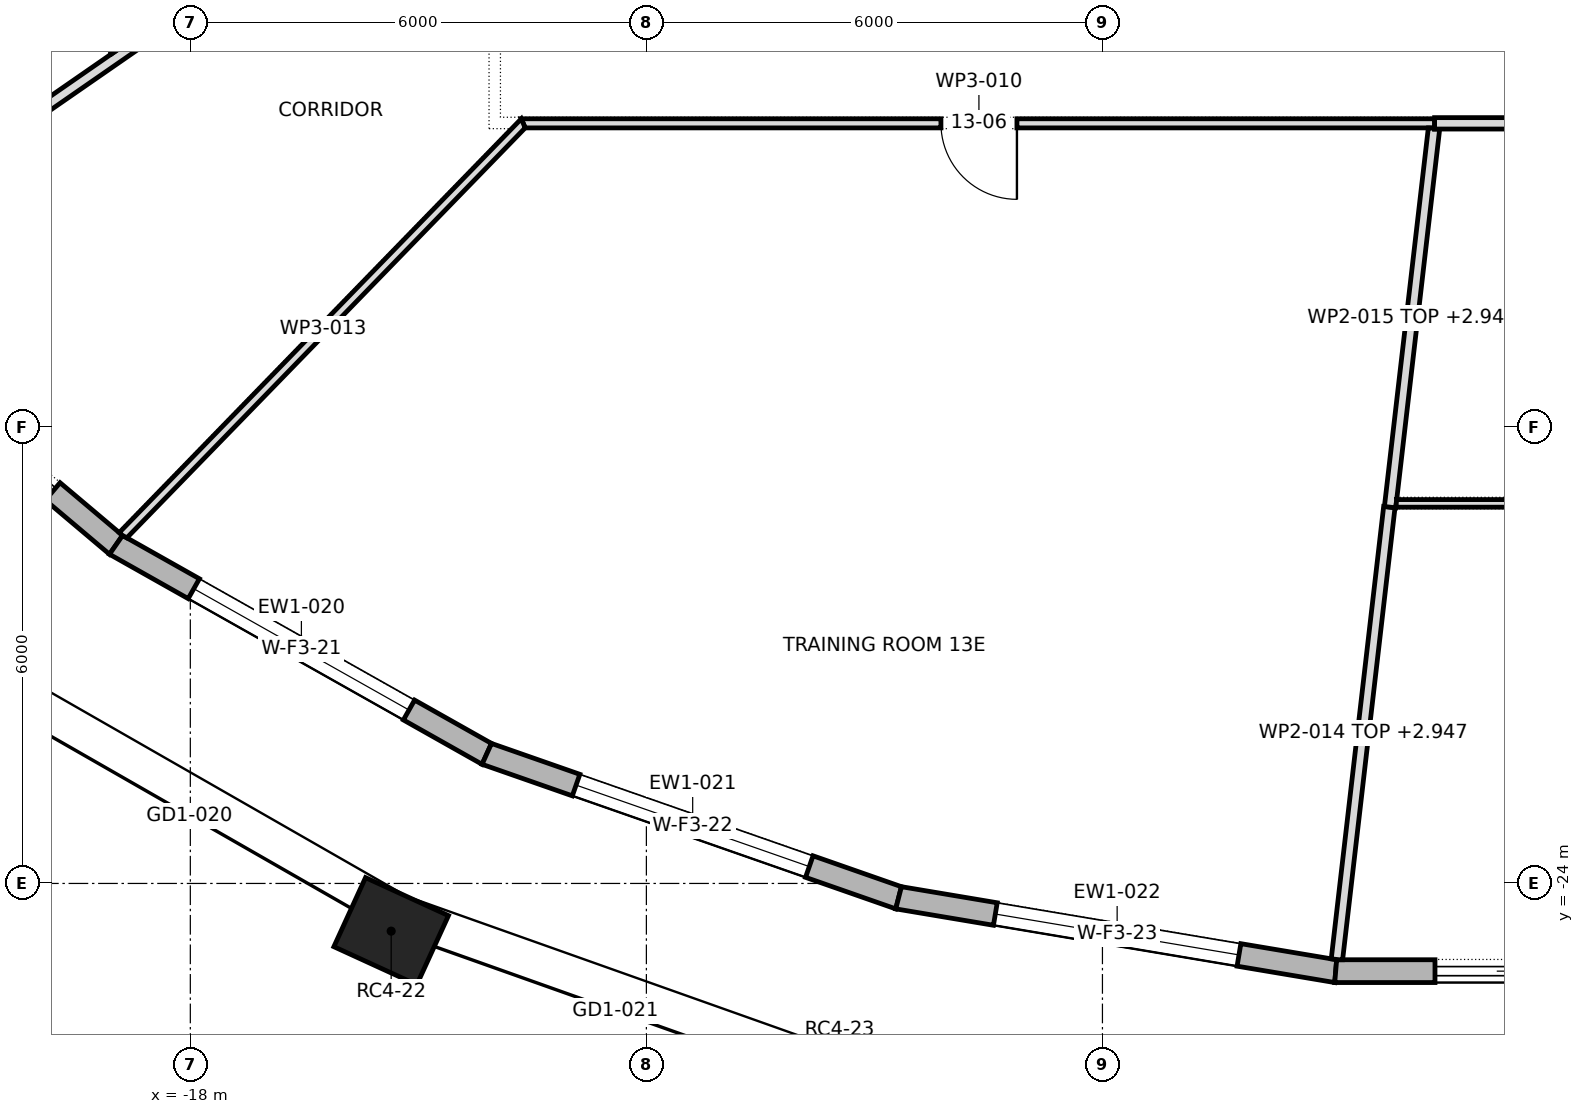
"""IFC4 building model, lengths in metres.
Left out: names, types, materials, properties, quantities, classifications, styles, units other than length and angle.
Written with IfcOpenShell. Run it as: python <this file> out.ifc"""

import sys

from ifc_helpers import new_model, si_unit, direction, frame, frame_2d, origin, origin_2d, place, context, subcontext, project, spatial, polyline, rectangle, outline, extrude, element, fill, save


model = new_model("IFC4")
c1 = context("Model", 3, precision=1e-05, world=origin(), true_north=direction((0.0, 1.0)))
c2 = subcontext(c1, "Body", "Model", "MODEL_VIEW")
j1 = project(units=[si_unit("LENGTHUNIT", "METRE"), si_unit("PLANEANGLEUNIT", "RADIAN")], contexts=[c1])
p1 = place(None, origin())
s1 = spatial("IfcSite", under=j1, at=p1, CompositionType="ELEMENT")
p2 = place(p1, origin())
s2 = spatial("IfcBuilding", under=s1, at=p2, CompositionType="ELEMENT")
p3 = place(p2, frame((0.0, 0.0, 190.9)))
s3 = spatial("IfcBuildingStorey", under=s2, at=p3, CompositionType="ELEMENT", Elevation=190.9)
p4 = place(p3, frame((-15.358, -24.627, 0.0), z_axis=(0.0, 0.0, 1.0), x_axis=(0.909125641902, -0.416521988898, 0.0)))
e1 = element("IfcColumn", 1, at=p4, inside=s3, PredefinedType="COLUMN", context=c2, shape_type="SweptSolid", body=[
    extrude(rectangle(XDim=1.2, YDim=1.0, at=origin_2d()), origin(), (0.0, 0.0, 1.0), 4.0),
])
p5 = place(p3, frame((-23.128, -16.044, 0.0), z_axis=(0.0, 0.0, 1.0), x_axis=(0.764330261608, -0.644824977176, 0.0)))
e2 = element("IfcWall", 2, at=p5, inside=s3, PredefinedType="STANDARD", context=c2, shape_type="SweptSolid", body=[
    extrude(outline(polyline([(-0.015, -0.15), (5.444, -0.15), (5.416, 0.15), (0.015, 0.15), (-0.015, -0.15)])), origin(), (0.0, 0.0, 1.0), 3.7),
])
p6 = place(p5, frame((1.09, 0.0, 0.0)))
e3 = element("IfcOpeningElement", 3, at=p6, cuts=e2, PredefinedType="OPENING", context=c2, shape_type="SweptSolid", body=[
    extrude(rectangle(XDim=3.25, YDim=3.25, at=frame_2d((1.625, 1.625))), frame((0.0, 0.162, 0.0), z_axis=(0.0, -1.0, 0.0), x_axis=(1.0, 0.0, 0.0)), (0.0, 0.0, 1.0), 0.324),
])
p7 = place(p3, frame((-18.977, -19.545, 0.0), z_axis=(0.0, 0.0, 1.0), x_axis=(0.871083701819, -0.491134588912, 0.0)))
e4 = element("IfcWall", 4, at=p7, inside=s3, PredefinedType="STANDARD", context=c2, shape_type="SweptSolid", body=[
    extrude(outline(polyline([(-0.014, -0.15), (5.613, -0.15), (5.586, 0.15), (0.014, 0.15), (-0.014, -0.15)])), origin(), (0.0, 0.0, 1.0), 3.7),
])
p8 = place(p7, frame((1.175, 0.0, 0.6)))
e5 = element("IfcOpeningElement", 5, at=p8, cuts=e4, PredefinedType="OPENING", context=c2, shape_type="SweptSolid", body=[
    extrude(rectangle(XDim=3.25, YDim=2.65, at=frame_2d((1.625, 1.325))), frame((0.0, 0.162, 0.0), z_axis=(0.0, -1.0, 0.0), x_axis=(1.0, 0.0, 0.0)), (0.0, 0.0, 1.0), 0.324),
])
p9 = place(p3, frame((-14.1, -22.295, 0.0), z_axis=(0.0, 0.0, 1.0), x_axis=(0.944020060936, -0.329888048511, 0.0)))
e6 = element("IfcWall", 6, at=p9, inside=s3, PredefinedType="STANDARD", context=c2, shape_type="SweptSolid", body=[
    extrude(outline(polyline([(-0.013, -0.15), (5.752, -0.15), (5.727, 0.15), (0.013, 0.15), (-0.013, -0.15)])), origin(), (0.0, 0.0, 1.0), 3.7),
])
p10 = place(p9, frame((1.245, 0.0, 0.6)))
e7 = element("IfcOpeningElement", 7, at=p10, cuts=e6, PredefinedType="OPENING", context=c2, shape_type="SweptSolid", body=[
    extrude(rectangle(XDim=3.25, YDim=2.65, at=frame_2d((1.625, 1.325))), frame((0.0, 0.162, 0.0), z_axis=(0.0, -1.0, 0.0), x_axis=(1.0, 0.0, 0.0)), (0.0, 0.0, 1.0), 0.324),
])
p11 = place(p3, frame((-8.682, -24.189, 0.0), z_axis=(0.0, 0.0, 1.0), x_axis=(0.986207709048, -0.165512400181, 0.0)))
e8 = element("IfcWall", 8, at=p11, inside=s3, PredefinedType="STANDARD", context=c2, shape_type="SweptSolid", body=[
    extrude(outline(polyline([(-0.013, -0.15), (5.843, -0.15), (5.818, 0.15), (0.013, 0.15), (-0.013, -0.15)])), origin(), (0.0, 0.0, 1.0), 3.7),
])
p12 = place(p11, frame((1.291, 0.0, 0.6)))
e9 = element("IfcOpeningElement", 9, at=p12, cuts=e8, PredefinedType="OPENING", context=c2, shape_type="SweptSolid", body=[
    extrude(rectangle(XDim=3.25, YDim=2.65, at=frame_2d((1.625, 1.325))), frame((0.0, 0.162, 0.0), z_axis=(0.0, -1.0, 0.0), x_axis=(1.0, 0.0, 0.0)), (0.0, 0.0, 1.0), 0.324),
])
p13 = place(p3, frame((-2.931, -25.154, 0.0), z_axis=(0.0, 0.0, 1.0), x_axis=(1.0, 0.0, 0.0)))
e10 = element("IfcWall", 10, at=p13, inside=s3, PredefinedType="STANDARD", context=c2, shape_type="SweptSolid", body=[
    extrude(outline(polyline([(-0.012, -0.15), (5.875, -0.15), (5.85, 0.15), (0.012, 0.15), (-0.012, -0.15)])), origin(), (0.0, 0.0, 1.0), 3.7),
])
p14 = place(p13, frame((1.306, 0.0, 0.0)))
e11 = element("IfcOpeningElement", 11, at=p14, cuts=e10, PredefinedType="OPENING", context=c2, shape_type="SweptSolid", body=[
    extrude(rectangle(XDim=3.25, YDim=3.25, at=frame_2d((1.625, 1.625))), frame((0.0, 0.162, 0.0), z_axis=(0.0, -1.0, 0.0), x_axis=(1.0, 0.0, 0.0)), (0.0, 0.0, 1.0), 0.324),
])
p15 = place(p3, frame((-23.024, -15.94, 0.0), z_axis=(0.0, 0.0, 1.0), x_axis=(0.822097241007, 0.569347105313, 0.0)))
e12 = element("IfcWall", 12, at=p15, inside=s3, PredefinedType="PARTITIONING", context=c2, shape_type="SweptSolid", body=[
    extrude(outline(polyline([(0.024, -0.075), (1.856, -0.075), (3.688, -0.075), (5.52, -0.075), (7.352, -0.075), (9.184, -0.075), (11.016, -0.075), (10.977, -0.0), (10.938, 0.075), (8.961, 0.075), (6.985, 0.075), (5.008, 0.075), (5.006, 0.072), (5.002, 0.075), (3.335, 0.075), (1.667, 0.075), (0.0, 0.075), (0.0, 0.068), (0.005, -0.002), (0.024, -0.075)])), origin(), (0.0, 0.0, 1.0), 2.947),
])
p16 = place(p3, frame((-19.0, -13.095, 0.0), z_axis=(0.0, 0.0, 1.0), x_axis=(0.0, 1.0, 0.0)))
e13 = element("IfcWall", 13, at=p16, inside=s3, PredefinedType="PARTITIONING", context=c2, shape_type="SweptSolid", body=[
    extrude(outline(polyline([(8.169, -0.05), (8.169, -0.049), (8.144, 0.05), (6.515, 0.05), (4.886, 0.05), (3.258, 0.05), (1.629, 0.05), (0.0, 0.05), (0.0, 0.049), (0.069, -0.05), (1.689, -0.05), (3.309, -0.05), (4.929, -0.05), (6.549, -0.05), (8.169, -0.05)])), origin(), (0.0, 0.0, 1.0), 3.7),
])
p17 = place(p16, frame((3.64, 0.0, 0.0)))
e14 = element("IfcOpeningElement", 14, at=p17, cuts=e13, PredefinedType="OPENING", context=c2, shape_type="SweptSolid", body=[
    extrude(rectangle(XDim=0.9, YDim=2.1, at=frame_2d((0.45, 1.05))), frame((0.0, 0.062, 0.0), z_axis=(0.0, -1.0, 0.0), x_axis=(1.0, 0.0, 0.0)), (0.0, 0.0, 1.0), 0.124),
])
p18 = place(p3, frame((-13.646, -14.0, 0.0), z_axis=(0.0, 0.0, 1.0), x_axis=(1.0, 0.0, 0.0)))
e15 = element("IfcWall", 15, at=p18, inside=s3, PredefinedType="PARTITIONING", context=c2, shape_type="SweptSolid", body=[
    extrude(outline(polyline([(12.016, 0.06), (10.299, 0.06), (8.583, 0.06), (6.866, 0.06), (5.15, 0.06), (3.433, 0.06), (1.717, 0.06), (0.0, 0.06), (0.051, -0.06), (2.045, -0.06), (4.039, -0.06), (6.033, -0.06), (8.027, -0.06), (10.021, -0.06), (12.016, -0.06), (12.016, 0.06)])), origin(), (0.0, 0.0, 1.0), 3.7),
])
p19 = place(p18, frame((5.521, 0.0, 0.0)))
e16 = element("IfcOpeningElement", 16, at=p19, cuts=e15, PredefinedType="OPENING", context=c2, shape_type="SweptSolid", body=[
    extrude(rectangle(XDim=1.0, YDim=2.1, at=frame_2d((0.5, 1.05))), frame((0.0, 0.072, 0.0), z_axis=(0.0, -1.0, 0.0), x_axis=(1.0, 0.0, 0.0)), (0.0, 0.0, 1.0), 0.144),
])
p20 = place(p3, frame((-13.602, -13.982, 0.0), z_axis=(0.0, 0.0, 1.0), x_axis=(-0.69685470262, -0.717212328001, 0.0)))
e17 = element("IfcWall", 17, at=p20, inside=s3, PredefinedType="PARTITIONING", context=c2, shape_type="SweptSolid", body=[
    extrude(outline(polyline([(7.591, -0.06), (7.591, -0.058), (7.587, -0.003), (7.571, 0.06), (5.691, 0.06), (3.811, 0.06), (1.931, 0.06), (0.051, 0.06), (0.025, 0.0), (0.0, -0.06), (0.0, -0.06), (0.0, -0.06), (1.898, -0.06), (3.796, -0.06), (5.694, -0.06), (7.591, -0.06)])), origin(), (0.0, 0.0, 1.0), 3.7),
])
p21 = place(p3, frame((-2.915, -25.0, 0.0), z_axis=(0.0, 0.0, 1.0), x_axis=(0.115112831027, 0.993352422926, 0.0)))
e18 = element("IfcWall", 18, at=p21, inside=s3, PredefinedType="PARTITIONING", context=c2, shape_type="SweptSolid", body=[
    extrude(outline(polyline([(0.0, 0.075), (0.0, -0.031), (0.005, -0.075), (2.0, -0.075), (3.996, -0.075), (5.991, -0.075), (5.991, 0.075), (3.994, 0.075), (1.997, 0.075), (0.0, 0.075)])), origin(), (0.0, 0.0, 1.0), 2.947),
])
p22 = place(p3, frame((-2.216, -19.05, 0.0), z_axis=(0.0, 0.0, 1.0), x_axis=(0.11524289965, 0.993337341531, 0.0)))
e19 = element("IfcWall", 19, at=p22, inside=s3, PredefinedType="PARTITIONING", context=c2, shape_type="SweptSolid", body=[
    extrude(outline(polyline([(0.0, -0.075), (0.099, -0.075), (0.109, -0.074), (0.109, -0.075), (1.745, -0.075), (3.381, -0.075), (5.017, -0.075), (5.017, -0.073), (5.009, -0.009), (5.017, -0.008), (5.017, 0.058), (5.015, 0.075), (3.343, 0.075), (1.672, 0.075), (0.0, 0.075), (0.0, -0.065), (0.0, -0.065), (0.0, -0.075)])), origin(), (0.0, 0.0, 1.0), 2.947),
])
p23 = place(p3, frame((-1.63, -14.0, 0.0), z_axis=(0.0, 0.0, 1.0), x_axis=(1.0, 0.0, 0.0)))
e20 = element("IfcWall", 20, at=p23, inside=s3, PredefinedType="PARTITIONING", context=c2, shape_type="SweptSolid", body=[
    extrude(outline(polyline([(0.0, -0.075), (1.902, -0.075), (3.804, -0.075), (5.707, -0.075), (7.609, -0.075), (9.511, -0.075), (11.414, -0.075), (13.316, -0.075), (15.218, -0.075), (15.281, 0.075), (15.281, 0.075), (13.371, 0.075), (11.461, 0.075), (9.551, 0.075), (7.641, 0.075), (5.73, 0.075), (3.82, 0.075), (1.91, 0.075), (0.0, 0.075), (0.0, -0.075)])), origin(), (0.0, 0.0, 1.0), 3.7),
])
p24 = place(p23, frame((2.83, 0.0, 0.0)))
e21 = element("IfcOpeningElement", 21, at=p24, cuts=e20, PredefinedType="OPENING", context=c2, shape_type="SweptSolid", body=[
    extrude(rectangle(XDim=1.0, YDim=2.1, at=frame_2d((0.5, 1.05))), frame((0.0, 0.087, 0.0), z_axis=(0.0, -1.0, 0.0), x_axis=(1.0, 0.0, 0.0)), (0.0, 0.0, 1.0), 0.174),
])
p25 = place(p23, frame((10.455, 0.0, 0.0)))
e22 = element("IfcOpeningElement", 22, at=p25, cuts=e20, PredefinedType="OPENING", context=c2, shape_type="SweptSolid", body=[
    extrude(rectangle(XDim=1.0, YDim=2.1, at=frame_2d((0.5, 1.05))), frame((0.0, 0.087, 0.0), z_axis=(0.0, -1.0, 0.0), x_axis=(1.0, 0.0, 0.0)), (0.0, 0.0, 1.0), 0.174),
])
p26 = place(p3, frame((6.765, -19.0, 0.0), z_axis=(0.0, 0.0, 1.0), x_axis=(-1.0, 0.0, 0.0)))
e23 = element("IfcWall", 23, at=p26, inside=s3, PredefinedType="PARTITIONING", context=c2, shape_type="SweptSolid", body=[
    extrude(outline(polyline([(0.035, -0.05), (1.807, -0.05), (3.579, -0.05), (5.351, -0.05), (7.122, -0.05), (8.894, -0.05), (8.905, 0.046), (8.905, 0.05), (7.124, 0.05), (5.343, 0.05), (3.562, 0.05), (1.781, 0.05), (0.0, 0.05), (0.0, 0.049), (0.035, -0.05)])), origin(), (0.0, 0.0, 1.0), 3.7),
])
p27 = place(p26, frame((4.006, 0.0, 0.0)))
e24 = element("IfcOpeningElement", 24, at=p27, cuts=e23, PredefinedType="OPENING", context=c2, shape_type="SweptSolid", body=[
    extrude(rectangle(XDim=0.9, YDim=2.1, at=frame_2d((0.45, 1.05))), frame((0.0, 0.062, 0.0), z_axis=(0.0, -1.0, 0.0), x_axis=(1.0, 0.0, 0.0)), (0.0, 0.0, 1.0), 0.124),
])
p28 = place(p6, origin())
e25 = element("IfcDoor", 25, at=p28, inside=s3, OperationType="DOUBLE_DOOR_SLIDING", PredefinedType="DOOR", context=c2, shape_type="SweptSolid", body=[
    extrude(rectangle(XDim=3.25, YDim=3.25, at=frame_2d((1.625, 1.625))), frame((0.0, 0.025, 0.0), z_axis=(0.0, -1.0, 0.0), x_axis=(1.0, 0.0, 0.0)), (0.0, 0.0, 1.0), 0.05),
])
fill(e3, e25)
p29 = place(p8, origin())
e26 = element("IfcWindow", 26, at=p29, inside=s3, PartitioningType="TRIPLE_PANEL_VERTICAL", PredefinedType="WINDOW", context=c2, shape_type="SweptSolid", body=[
    extrude(rectangle(XDim=3.25, YDim=2.65, at=frame_2d((1.625, 1.325))), frame((0.0, 0.03, 0.0), z_axis=(0.0, -1.0, 0.0), x_axis=(1.0, 0.0, 0.0)), (0.0, 0.0, 1.0), 0.06),
])
fill(e5, e26)
p30 = place(p10, origin())
e27 = element("IfcWindow", 27, at=p30, inside=s3, PartitioningType="TRIPLE_PANEL_VERTICAL", PredefinedType="WINDOW", context=c2, shape_type="SweptSolid", body=[
    extrude(rectangle(XDim=3.25, YDim=2.65, at=frame_2d((1.625, 1.325))), frame((0.0, 0.03, 0.0), z_axis=(0.0, -1.0, 0.0), x_axis=(1.0, 0.0, 0.0)), (0.0, 0.0, 1.0), 0.06),
])
fill(e7, e27)
p31 = place(p12, origin())
e28 = element("IfcWindow", 28, at=p31, inside=s3, PartitioningType="TRIPLE_PANEL_VERTICAL", PredefinedType="WINDOW", context=c2, shape_type="SweptSolid", body=[
    extrude(rectangle(XDim=3.25, YDim=2.65, at=frame_2d((1.625, 1.325))), frame((0.0, 0.03, 0.0), z_axis=(0.0, -1.0, 0.0), x_axis=(1.0, 0.0, 0.0)), (0.0, 0.0, 1.0), 0.06),
])
fill(e9, e28)
p32 = place(p14, origin())
e29 = element("IfcDoor", 29, at=p32, inside=s3, OperationType="DOUBLE_DOOR_SLIDING", PredefinedType="DOOR", context=c2, shape_type="SweptSolid", body=[
    extrude(rectangle(XDim=3.25, YDim=3.25, at=frame_2d((1.625, 1.625))), frame((0.0, 0.025, 0.0), z_axis=(0.0, -1.0, 0.0), x_axis=(1.0, 0.0, 0.0)), (0.0, 0.0, 1.0), 0.05),
])
fill(e11, e29)
p33 = place(p19, frame((1.0, 0.0, 0.0), z_axis=(0.0, 0.0, 1.0), x_axis=(-1.0, 0.0, 0.0)))
e30 = element("IfcDoor", 30, at=p33, inside=s3, OperationType="SINGLE_SWING_RIGHT", PredefinedType="DOOR", context=c2, shape_type="SweptSolid", body=[
    extrude(rectangle(XDim=1.0, YDim=2.1, at=frame_2d((0.5, 1.05))), frame((0.0, 0.025, 0.0), z_axis=(0.0, -1.0, 0.0), x_axis=(1.0, 0.0, 0.0)), (0.0, 0.0, 1.0), 0.05),
])
fill(e16, e30)
save(model, sys.argv[1])
